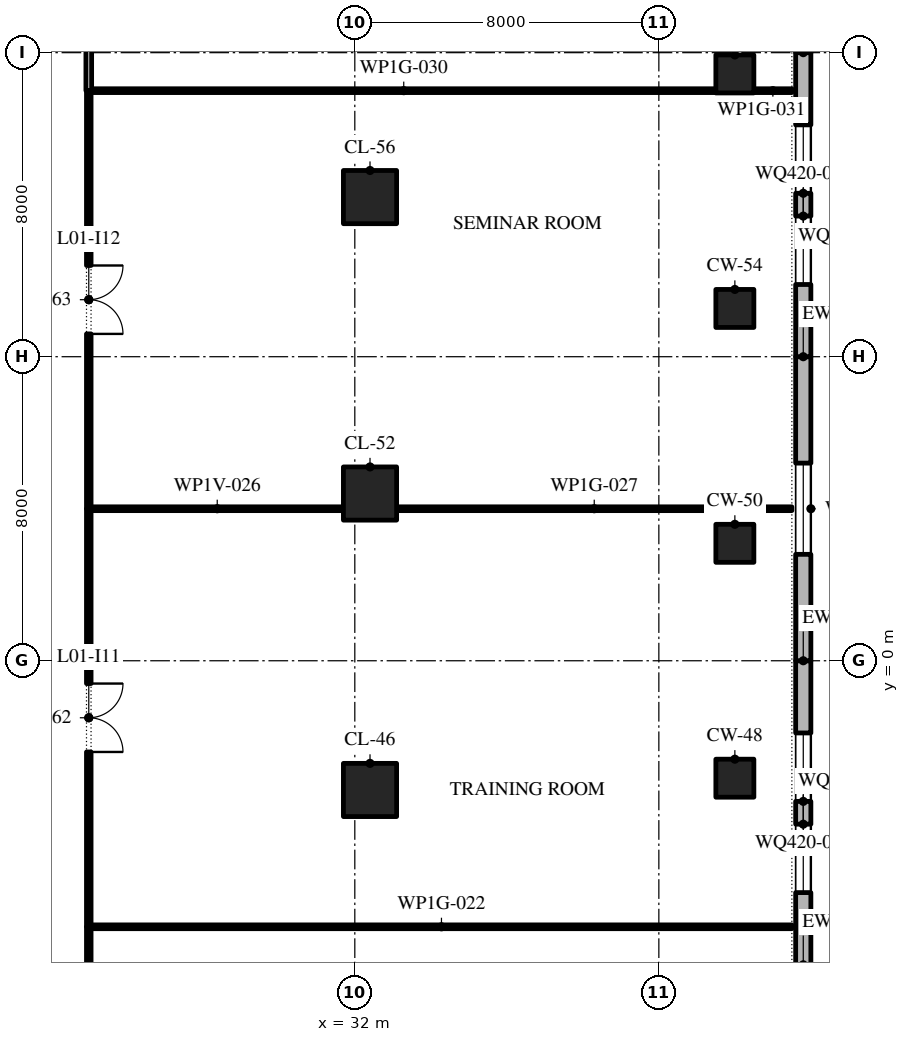
"""IFC4 building model, lengths in metres.
Left out: names, types, materials, properties, quantities, classifications, styles, units other than length and angle.
Written with IfcOpenShell. Run it as: python <this file> out.ifc"""

import sys

from ifc_helpers import new_model, si_unit, direction, frame, frame_2d, origin, origin_2d, place, context, subcontext, project, spatial, polyline, rectangle, outline, extrude, element, fill, save


model = new_model("IFC4")
c1 = context("Model", 3, precision=1e-05, world=origin(), true_north=direction((0.0, 1.0)))
c2 = subcontext(c1, "Body", "Model", "MODEL_VIEW")
j1 = project(units=[si_unit("LENGTHUNIT", "METRE"), si_unit("PLANEANGLEUNIT", "RADIAN")], contexts=[c1])
p1 = place(None, origin())
s1 = spatial("IfcSite", under=j1, at=p1, CompositionType="ELEMENT")
p2 = place(p1, origin())
s2 = spatial("IfcBuilding", under=s1, at=p2, CompositionType="ELEMENT")
p3 = place(p2, frame((0.0, 0.0, 8.0)))
s3 = spatial("IfcBuildingStorey", under=s2, at=p3, CompositionType="ELEMENT", Elevation=8.0)
p4 = place(p3, frame((32.4, -3.4, 0.0), z_axis=(0.0, 0.0, 1.0), x_axis=(1.0, 0.0, 0.0)))
e1 = element("IfcColumn", 1, at=p4, inside=s3, PredefinedType="COLUMN", context=c2, shape_type="SweptSolid", body=[
    extrude(rectangle(XDim=1.4, YDim=1.4, at=origin_2d()), origin(), (0.0, 0.0, 1.0), 6.0),
])
for number, where, z_axis, x_axis in (
    (2, (42.0, -3.09, 0.0), (0.0, 0.0, 1.0), (1.0, 0.0, 0.0)),
    (3, (42.0, 3.09, 0.0), (0.0, 0.0, 1.0), (1.0, 0.0, 0.0)),
):
    element("IfcColumn", number, at=place(p3, frame(where, z_axis=z_axis, x_axis=x_axis)), inside=s3, PredefinedType="COLUMN", context=c2, shape_type="SweptSolid", body=[
        extrude(rectangle(XDim=1.0, YDim=1.0, at=origin_2d()), origin(), (0.0, 0.0, 1.0), 6.0),
    ])
p5 = place(p3, frame((32.4, 4.4, 0.0), z_axis=(0.0, 0.0, 1.0), x_axis=(1.0, 0.0, 0.0)))
e4 = element("IfcColumn", 4, at=p5, inside=s3, PredefinedType="COLUMN", context=c2, shape_type="SweptSolid", body=[
    extrude(rectangle(XDim=1.4, YDim=1.4, at=origin_2d()), origin(), (0.0, 0.0, 1.0), 6.0),
])
p6 = place(p3, frame((42.0, 9.27, 0.0), z_axis=(0.0, 0.0, 1.0), x_axis=(1.0, 0.0, 0.0)))
e5 = element("IfcColumn", 5, at=p6, inside=s3, PredefinedType="COLUMN", context=c2, shape_type="SweptSolid", body=[
    extrude(rectangle(XDim=1.0, YDim=1.0, at=origin_2d()), origin(), (0.0, 0.0, 1.0), 6.0),
])
p7 = place(p3, frame((32.4, 12.2, 0.0), z_axis=(0.0, 0.0, 1.0), x_axis=(1.0, 0.0, 0.0)))
e6 = element("IfcColumn", 6, at=p7, inside=s3, PredefinedType="COLUMN", context=c2, shape_type="SweptSolid", body=[
    extrude(rectangle(XDim=1.4, YDim=1.4, at=origin_2d()), origin(), (0.0, 0.0, 1.0), 6.0),
])
p8 = place(p3, frame((42.0, 15.44, 0.0), z_axis=(0.0, 0.0, 1.0), x_axis=(1.0, 0.0, 0.0)))
e7 = element("IfcColumn", 7, at=p8, inside=s3, PredefinedType="COLUMN", context=c2, shape_type="SweptSolid", body=[
    extrude(rectangle(XDim=1.0, YDim=1.0, at=origin_2d()), origin(), (0.0, 0.0, 1.0), 6.0),
])
p9 = place(p3, frame((43.8, -8.0, 0.0), z_axis=(0.0, 0.0, 1.0), x_axis=(0.0, 1.0, 0.0)))
e8 = element("IfcWall", 8, at=p9, inside=s3, PredefinedType="STANDARD", context=c2, shape_type="SweptSolid", body=[
    extrude(rectangle(XDim=8.0, YDim=0.4, at=frame_2d((4.0, 0.0))), origin(), (0.0, 0.0, 1.0), 5.7),
])
p10 = place(p9, frame((1.9, 0.0, 0.9)))
e9 = element("IfcOpeningElement", 9, at=p10, cuts=e8, PredefinedType="OPENING", context=c2, shape_type="SweptSolid", body=[
    extrude(outline(polyline([(0.0, 0.0), (1.8, 0.0), (1.8, 2.641), (1.785, 2.876), (1.739, 3.107), (1.663, 3.33), (1.559, 3.541), (1.428, 3.737), (1.273, 3.914), (1.096, 4.069), (0.9, 4.2), (0.704, 4.069), (0.527, 3.914), (0.372, 3.737), (0.241, 3.541), (0.137, 3.33), (0.061, 3.107), (0.015, 2.876), (0.0, 2.641), (0.0, 0.0)])), frame((0.0, 0.21, 0.0), z_axis=(0.0, -1.0, 0.0), x_axis=(1.0, 0.0, 0.0)), (0.0, 0.0, 1.0), 0.42),
])
p11 = place(p9, frame((4.3, 0.0, 0.9)))
e10 = element("IfcOpeningElement", 10, at=p11, cuts=e8, PredefinedType="OPENING", context=c2, shape_type="SweptSolid", body=[
    extrude(outline(polyline([(0.0, 0.0), (1.8, 0.0), (1.8, 2.641), (1.785, 2.876), (1.739, 3.107), (1.663, 3.33), (1.559, 3.541), (1.428, 3.737), (1.273, 3.914), (1.096, 4.069), (0.9, 4.2), (0.704, 4.069), (0.527, 3.914), (0.372, 3.737), (0.241, 3.541), (0.137, 3.33), (0.061, 3.107), (0.015, 2.876), (0.0, 2.641), (0.0, 0.0)])), frame((0.0, 0.21, 0.0), z_axis=(0.0, -1.0, 0.0), x_axis=(1.0, 0.0, 0.0)), (0.0, 0.0, 1.0), 0.42),
])
p12 = place(p3, frame((43.8, 0.0, 0.0), z_axis=(0.0, 0.0, 1.0), x_axis=(0.0, 1.0, 0.0)))
e11 = element("IfcWall", 11, at=p12, inside=s3, PredefinedType="STANDARD", context=c2, shape_type="SweptSolid", body=[
    extrude(rectangle(XDim=8.0, YDim=0.4, at=frame_2d((4.0, 0.0))), origin(), (0.0, 0.0, 1.0), 5.7),
])
p13 = place(p12, frame((2.8, 0.0, 0.9)))
e12 = element("IfcOpeningElement", 12, at=p13, cuts=e11, PredefinedType="OPENING", context=c2, shape_type="SweptSolid", body=[
    extrude(outline(polyline([(0.0, 0.0), (2.4, 0.0), (2.4, 2.122), (2.379, 2.435), (2.318, 2.743), (2.217, 3.04), (2.078, 3.322), (1.904, 3.583), (1.697, 3.819), (1.461, 4.026), (1.2, 4.2), (0.939, 4.026), (0.703, 3.819), (0.496, 3.583), (0.322, 3.322), (0.183, 3.04), (0.082, 2.743), (0.021, 2.435), (0.0, 2.122), (0.0, 0.0)])), frame((0.0, 0.21, 0.0), z_axis=(0.0, -1.0, 0.0), x_axis=(1.0, 0.0, 0.0)), (0.0, 0.0, 1.0), 0.42),
])
p14 = place(p3, frame((43.8, 8.0, 0.0), z_axis=(0.0, 0.0, 1.0), x_axis=(0.0, 1.0, 0.0)))
e13 = element("IfcWall", 13, at=p14, inside=s3, PredefinedType="STANDARD", context=c2, shape_type="SweptSolid", body=[
    extrude(rectangle(XDim=8.0, YDim=0.4, at=frame_2d((4.0, 0.0))), origin(), (0.0, 0.0, 1.0), 5.7),
])
p15 = place(p14, frame((1.9, 0.0, 0.9)))
e14 = element("IfcOpeningElement", 14, at=p15, cuts=e13, PredefinedType="OPENING", context=c2, shape_type="SweptSolid", body=[
    extrude(outline(polyline([(0.0, 0.0), (1.8, 0.0), (1.8, 2.641), (1.785, 2.876), (1.739, 3.107), (1.663, 3.33), (1.559, 3.541), (1.428, 3.737), (1.273, 3.914), (1.096, 4.069), (0.9, 4.2), (0.704, 4.069), (0.527, 3.914), (0.372, 3.737), (0.241, 3.541), (0.137, 3.33), (0.061, 3.107), (0.015, 2.876), (0.0, 2.641), (0.0, 0.0)])), frame((0.0, 0.21, 0.0), z_axis=(0.0, -1.0, 0.0), x_axis=(1.0, 0.0, 0.0)), (0.0, 0.0, 1.0), 0.42),
])
p16 = place(p14, frame((4.3, 0.0, 0.9)))
e15 = element("IfcOpeningElement", 15, at=p16, cuts=e13, PredefinedType="OPENING", context=c2, shape_type="SweptSolid", body=[
    extrude(outline(polyline([(0.0, 0.0), (1.8, 0.0), (1.8, 2.641), (1.785, 2.876), (1.739, 3.107), (1.663, 3.33), (1.559, 3.541), (1.428, 3.737), (1.273, 3.914), (1.096, 4.069), (0.9, 4.2), (0.704, 4.069), (0.527, 3.914), (0.372, 3.737), (0.241, 3.541), (0.137, 3.33), (0.061, 3.107), (0.015, 2.876), (0.0, 2.641), (0.0, 0.0)])), frame((0.0, 0.21, 0.0), z_axis=(0.0, -1.0, 0.0), x_axis=(1.0, 0.0, 0.0)), (0.0, 0.0, 1.0), 0.42),
])
p17 = place(p3, frame((25.06, -7.0, 0.0), z_axis=(0.0, 0.0, 1.0), x_axis=(1.0, 0.0, 0.0)))
e16 = element("IfcWall", 16, at=p17, inside=s3, PredefinedType="PARTITIONING", context=c2, shape_type="SweptSolid", body=[
    extrude(rectangle(XDim=18.44, YDim=0.1, at=frame_2d((9.22, 0.0))), origin(), (0.0, 0.0, 1.0), 5.7),
])
p18 = place(p3, frame((25.06, 4.0, 0.0), z_axis=(0.0, 0.0, 1.0), x_axis=(1.0, 0.0, 0.0)))
e17 = element("IfcWall", 17, at=p18, inside=s3, PredefinedType="PARTITIONING", context=c2, shape_type="SweptSolid", body=[
    extrude(rectangle(XDim=6.64, YDim=0.1, at=frame_2d((3.32, 0.0))), origin(), (0.0, 0.0, 1.0), 5.164),
])
p19 = place(p3, frame((33.1, 4.0, 0.0), z_axis=(0.0, 0.0, 1.0), x_axis=(1.0, 0.0, 0.0)))
e18 = element("IfcWall", 18, at=p19, inside=s3, PredefinedType="PARTITIONING", context=c2, shape_type="SweptSolid", body=[
    extrude(rectangle(XDim=10.4, YDim=0.1, at=frame_2d((5.2, 0.0))), origin(), (0.0, 0.0, 1.0), 5.7),
])
p20 = place(p3, frame((25.075, 15.0, 0.0), z_axis=(0.0, 0.0, 1.0), x_axis=(1.0, 0.0, 0.0)))
e19 = element("IfcWall", 19, at=p20, inside=s3, PredefinedType="PARTITIONING", context=c2, shape_type="SweptSolid", body=[
    extrude(rectangle(XDim=16.425, YDim=0.1, at=frame_2d((8.212, 0.0))), origin(), (0.0, 0.0, 1.0), 5.7),
])
p21 = place(p3, frame((42.5, 15.0, 0.0), z_axis=(0.0, 0.0, 1.0), x_axis=(1.0, 0.0, 0.0)))
e20 = element("IfcWall", 20, at=p21, inside=s3, PredefinedType="PARTITIONING", context=c2, shape_type="SweptSolid", body=[
    extrude(rectangle(XDim=1.0, YDim=0.1, at=frame_2d((0.5, 0.0))), origin(), (0.0, 0.0, 1.0), 5.7),
])
p22 = place(p3, frame((25.0, -18.0, 0.0), z_axis=(0.0, 0.0, 1.0), x_axis=(0.0, 1.0, 0.0)))
e21 = element("IfcWall", 21, at=p22, inside=s3, PredefinedType="PARTITIONING", context=c2, shape_type="SweptSolid", body=[
    extrude(rectangle(XDim=11.0, YDim=0.12, at=frame_2d((5.5, 0.0))), origin(), (0.0, 0.0, 1.0), 5.7),
])
p23 = place(p22, frame((4.6, 0.0, 0.0)))
e22 = element("IfcOpeningElement", 22, at=p23, cuts=e21, PredefinedType="OPENING", context=c2, shape_type="SweptSolid", body=[
    extrude(rectangle(XDim=1.8, YDim=2.1, at=frame_2d((0.9, 1.05))), frame((0.0, 0.07, 0.0), z_axis=(0.0, -1.0, 0.0), x_axis=(1.0, 0.0, 0.0)), (0.0, 0.0, 1.0), 0.14),
])
p24 = place(p3, frame((25.0, -7.0, 0.0), z_axis=(0.0, 0.0, 1.0), x_axis=(0.0, 1.0, 0.0)))
e23 = element("IfcWall", 23, at=p24, inside=s3, PredefinedType="PARTITIONING", context=c2, shape_type="SweptSolid", body=[
    extrude(rectangle(XDim=11.0, YDim=0.12, at=frame_2d((5.5, 0.0))), origin(), (0.0, 0.0, 1.0), 5.7),
])
p25 = place(p24, frame((4.6, 0.0, 0.0)))
e24 = element("IfcOpeningElement", 24, at=p25, cuts=e23, PredefinedType="OPENING", context=c2, shape_type="SweptSolid", body=[
    extrude(rectangle(XDim=1.8, YDim=2.1, at=frame_2d((0.9, 1.05))), frame((0.0, 0.07, 0.0), z_axis=(0.0, -1.0, 0.0), x_axis=(1.0, 0.0, 0.0)), (0.0, 0.0, 1.0), 0.14),
])
p26 = place(p3, frame((25.0, 4.0, 0.0), z_axis=(0.0, 0.0, 1.0), x_axis=(0.0, 1.0, 0.0)))
e25 = element("IfcWall", 25, at=p26, inside=s3, PredefinedType="PARTITIONING", context=c2, shape_type="SweptSolid", body=[
    extrude(rectangle(XDim=11.0, YDim=0.12, at=frame_2d((5.5, 0.0))), origin(), (0.0, 0.0, 1.0), 5.7),
])
p27 = place(p26, frame((4.6, 0.0, 0.0)))
e26 = element("IfcOpeningElement", 26, at=p27, cuts=e25, PredefinedType="OPENING", context=c2, shape_type="SweptSolid", body=[
    extrude(rectangle(XDim=1.8, YDim=2.1, at=frame_2d((0.9, 1.05))), frame((0.0, 0.07, 0.0), z_axis=(0.0, -1.0, 0.0), x_axis=(1.0, 0.0, 0.0)), (0.0, 0.0, 1.0), 0.14),
])
p28 = place(p3, frame((25.0, 15.0, 0.0), z_axis=(0.0, 0.0, 1.0), x_axis=(0.0, 1.0, 0.0)))
e27 = element("IfcWall", 27, at=p28, inside=s3, PredefinedType="PARTITIONING", context=c2, shape_type="SweptSolid", body=[
    extrude(rectangle(XDim=11.0, YDim=0.15, at=frame_2d((5.5, 0.0))), origin(), (0.0, 0.0, 1.0), 5.7),
])
p29 = place(p28, frame((4.6, 0.0, 0.0)))
e28 = element("IfcOpeningElement", 28, at=p29, cuts=e27, PredefinedType="OPENING", context=c2, shape_type="SweptSolid", body=[
    extrude(rectangle(XDim=1.8, YDim=2.1, at=frame_2d((0.9, 1.05))), frame((0.0, 0.085, 0.0), z_axis=(0.0, -1.0, 0.0), x_axis=(1.0, 0.0, 0.0)), (0.0, 0.0, 1.0), 0.17),
])
p30 = place(p10, origin())
e29 = element("IfcWindow", 29, at=p30, inside=s3, PartitioningType="DOUBLE_PANEL_VERTICAL", PredefinedType="WINDOW", context=c2, shape_type="SweptSolid", body=[
    extrude(outline(polyline([(0.0, 0.0), (1.8, 0.0), (1.8, 2.641), (1.785, 2.876), (1.739, 3.107), (1.663, 3.33), (1.559, 3.541), (1.428, 3.737), (1.273, 3.914), (1.096, 4.069), (0.9, 4.2), (0.704, 4.069), (0.527, 3.914), (0.372, 3.737), (0.241, 3.541), (0.137, 3.33), (0.061, 3.107), (0.015, 2.876), (0.0, 2.641), (0.0, 0.0)])), frame((0.0, 0.03, 0.0), z_axis=(0.0, -1.0, 0.0), x_axis=(1.0, 0.0, 0.0)), (0.0, 0.0, 1.0), 0.06),
])
fill(e9, e29)
p31 = place(p11, origin())
e30 = element("IfcWindow", 30, at=p31, inside=s3, PartitioningType="DOUBLE_PANEL_VERTICAL", PredefinedType="WINDOW", context=c2, shape_type="SweptSolid", body=[
    extrude(outline(polyline([(0.0, 0.0), (1.8, 0.0), (1.8, 2.641), (1.785, 2.876), (1.739, 3.107), (1.663, 3.33), (1.559, 3.541), (1.428, 3.737), (1.273, 3.914), (1.096, 4.069), (0.9, 4.2), (0.704, 4.069), (0.527, 3.914), (0.372, 3.737), (0.241, 3.541), (0.137, 3.33), (0.061, 3.107), (0.015, 2.876), (0.0, 2.641), (0.0, 0.0)])), frame((0.0, 0.03, 0.0), z_axis=(0.0, -1.0, 0.0), x_axis=(1.0, 0.0, 0.0)), (0.0, 0.0, 1.0), 0.06),
])
fill(e10, e30)
p32 = place(p13, origin())
e31 = element("IfcWindow", 31, at=p32, inside=s3, PartitioningType="DOUBLE_PANEL_VERTICAL", PredefinedType="WINDOW", context=c2, shape_type="SweptSolid", body=[
    extrude(outline(polyline([(0.0, 0.0), (2.4, 0.0), (2.4, 2.122), (2.379, 2.435), (2.318, 2.743), (2.217, 3.04), (2.078, 3.322), (1.904, 3.583), (1.697, 3.819), (1.461, 4.026), (1.2, 4.2), (0.939, 4.026), (0.703, 3.819), (0.496, 3.583), (0.322, 3.322), (0.183, 3.04), (0.082, 2.743), (0.021, 2.435), (0.0, 2.122), (0.0, 0.0)])), frame((0.0, 0.03, 0.0), z_axis=(0.0, -1.0, 0.0), x_axis=(1.0, 0.0, 0.0)), (0.0, 0.0, 1.0), 0.06),
])
fill(e12, e31)
p33 = place(p15, origin())
e32 = element("IfcWindow", 32, at=p33, inside=s3, PartitioningType="DOUBLE_PANEL_VERTICAL", PredefinedType="WINDOW", context=c2, shape_type="SweptSolid", body=[
    extrude(outline(polyline([(0.0, 0.0), (1.8, 0.0), (1.8, 2.641), (1.785, 2.876), (1.739, 3.107), (1.663, 3.33), (1.559, 3.541), (1.428, 3.737), (1.273, 3.914), (1.096, 4.069), (0.9, 4.2), (0.704, 4.069), (0.527, 3.914), (0.372, 3.737), (0.241, 3.541), (0.137, 3.33), (0.061, 3.107), (0.015, 2.876), (0.0, 2.641), (0.0, 0.0)])), frame((0.0, 0.03, 0.0), z_axis=(0.0, -1.0, 0.0), x_axis=(1.0, 0.0, 0.0)), (0.0, 0.0, 1.0), 0.06),
])
fill(e14, e32)
p34 = place(p16, origin())
e33 = element("IfcWindow", 33, at=p34, inside=s3, PartitioningType="DOUBLE_PANEL_VERTICAL", PredefinedType="WINDOW", context=c2, shape_type="SweptSolid", body=[
    extrude(outline(polyline([(0.0, 0.0), (1.8, 0.0), (1.8, 2.641), (1.785, 2.876), (1.739, 3.107), (1.663, 3.33), (1.559, 3.541), (1.428, 3.737), (1.273, 3.914), (1.096, 4.069), (0.9, 4.2), (0.704, 4.069), (0.527, 3.914), (0.372, 3.737), (0.241, 3.541), (0.137, 3.33), (0.061, 3.107), (0.015, 2.876), (0.0, 2.641), (0.0, 0.0)])), frame((0.0, 0.03, 0.0), z_axis=(0.0, -1.0, 0.0), x_axis=(1.0, 0.0, 0.0)), (0.0, 0.0, 1.0), 0.06),
])
fill(e15, e33)
p35 = place(p25, frame((1.8, 0.0, 0.0), z_axis=(0.0, 0.0, 1.0), x_axis=(-1.0, 0.0, 0.0)))
e34 = element("IfcDoor", 34, at=p35, inside=s3, OperationType="SINGLE_SWING_LEFT", PredefinedType="DOOR", context=c2, shape_type="SweptSolid", body=[
    extrude(rectangle(XDim=1.8, YDim=2.1, at=frame_2d((0.9, 1.05))), frame((0.0, 0.025, 0.0), z_axis=(0.0, -1.0, 0.0), x_axis=(1.0, 0.0, 0.0)), (0.0, 0.0, 1.0), 0.05),
])
fill(e24, e34)
p36 = place(p27, frame((1.8, 0.0, 0.0), z_axis=(0.0, 0.0, 1.0), x_axis=(-1.0, 0.0, 0.0)))
e35 = element("IfcDoor", 35, at=p36, inside=s3, OperationType="SINGLE_SWING_LEFT", PredefinedType="DOOR", context=c2, shape_type="SweptSolid", body=[
    extrude(rectangle(XDim=1.8, YDim=2.1, at=frame_2d((0.9, 1.05))), frame((0.0, 0.025, 0.0), z_axis=(0.0, -1.0, 0.0), x_axis=(1.0, 0.0, 0.0)), (0.0, 0.0, 1.0), 0.05),
])
fill(e26, e35)
save(model, sys.argv[1])
